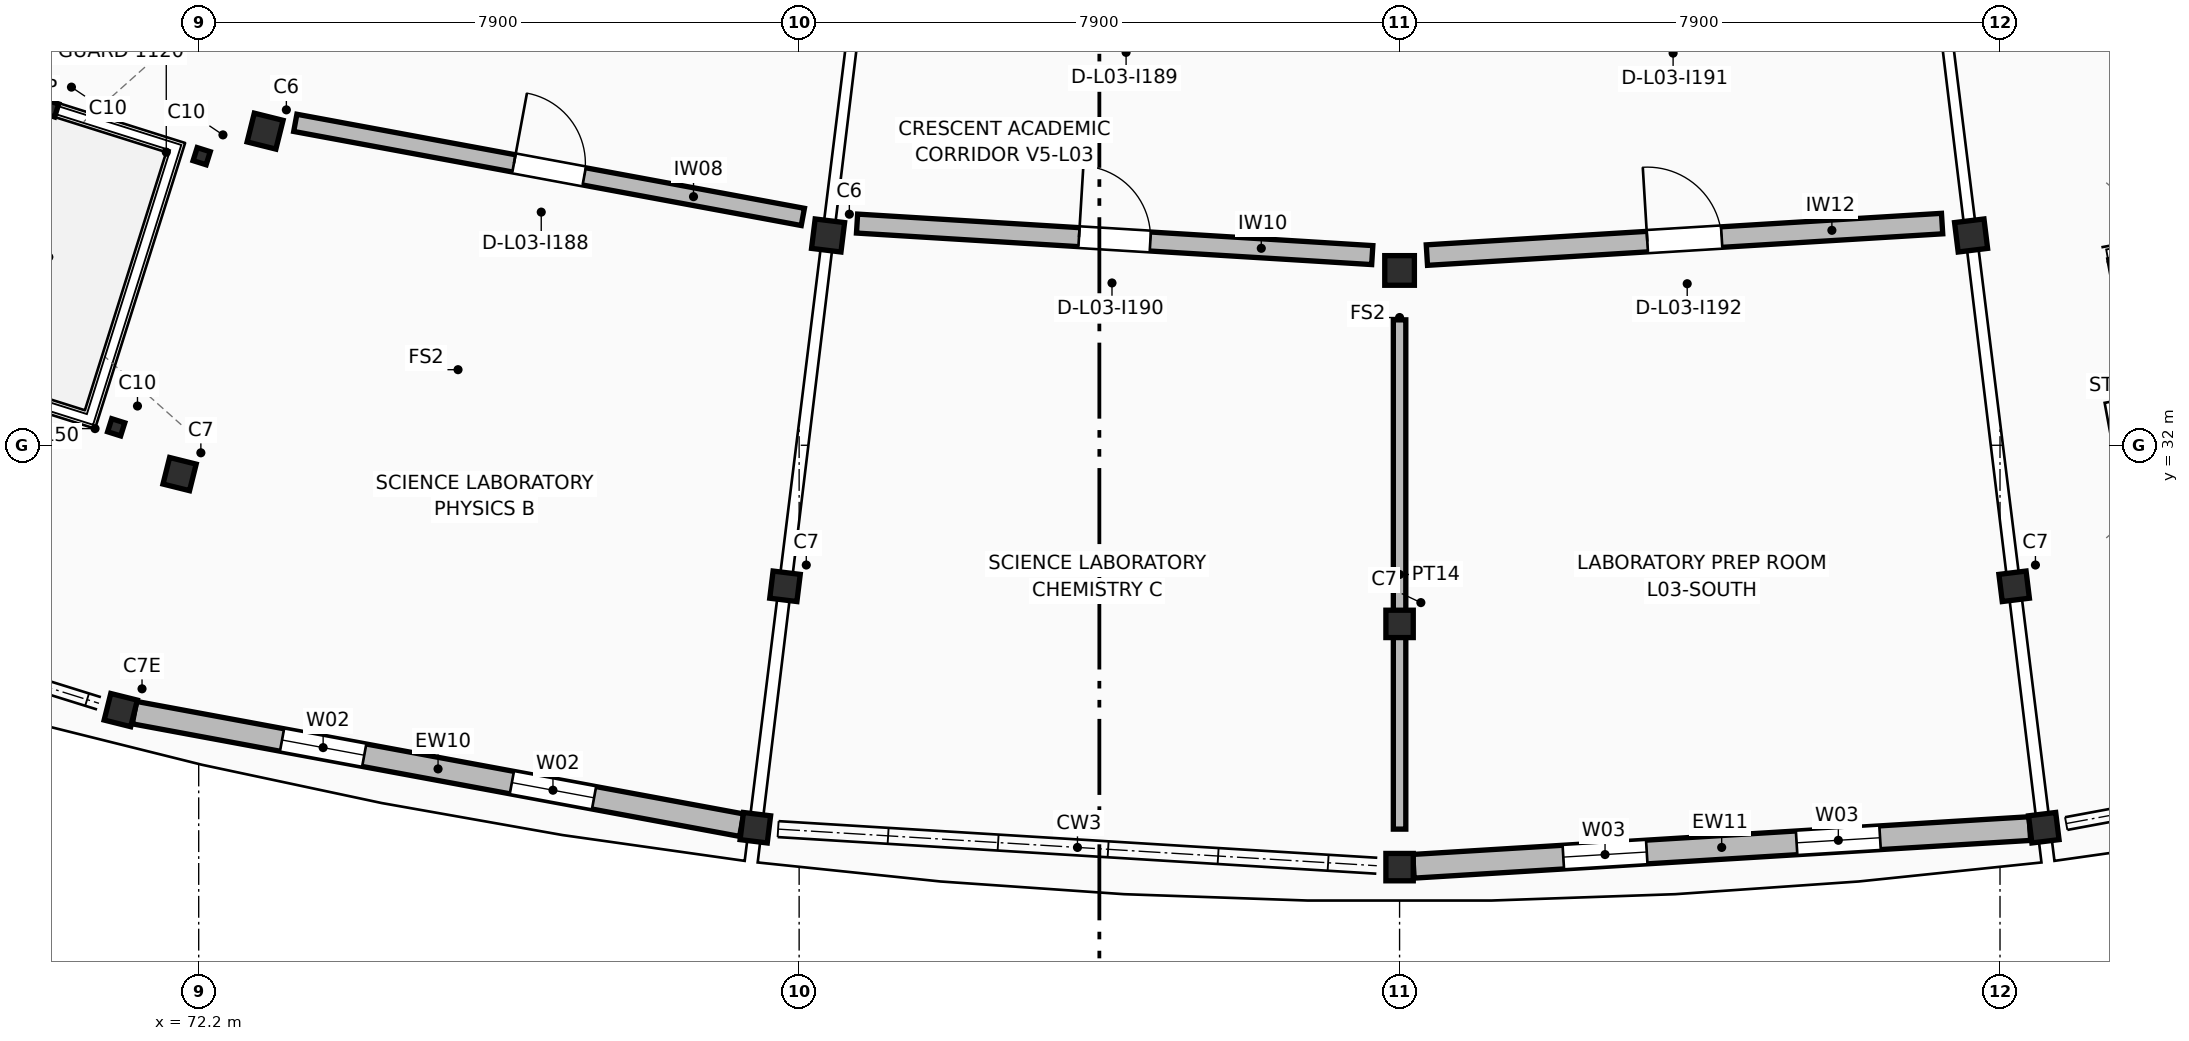
"""IFC4 building model, lengths in metres.
Left out: names, types, materials, properties, quantities, classifications, styles, units other than length and angle.
Written with IfcOpenShell. Run it as: python <this file> out.ifc"""

import sys

from ifc_helpers import new_model, si_unit, direction, frame, frame_2d, origin, origin_2d, place, context, subcontext, project, spatial, rectangle, hollow_rectangle, extrude, element, fill, save


model = new_model("IFC4")
c1 = context("Model", 3, precision=1e-05, world=origin(), true_north=direction((0.0, 1.0)))
c2 = subcontext(c1, "Body", "Model", "MODEL_VIEW")
j1 = project(units=[si_unit("LENGTHUNIT", "METRE"), si_unit("PLANEANGLEUNIT", "RADIAN")], contexts=[c1])
p1 = place(None, origin())
s1 = spatial("IfcSite", under=j1, at=p1, CompositionType="ELEMENT")
p2 = place(p1, origin())
s2 = spatial("IfcBuilding", under=s1, at=p2, CompositionType="ELEMENT")
p3 = place(p2, frame((0.0, 0.0, 11.9)))
s3 = spatial("IfcBuildingStorey", under=s2, at=p3, CompositionType="ELEMENT", Elevation=11.9)
p4 = place(p3, frame((73.073, 36.133, 0.0), z_axis=(0.0, 0.0, 1.0), x_axis=(-0.2419218956, -0.970295726276, 0.0)))
e1 = element("IfcColumn", 1, at=p4, inside=s3, PredefinedType="COLUMN", context=c2, shape_type="SweptSolid", body=[
    extrude(rectangle(XDim=0.39, YDim=0.39, at=origin_2d()), origin(), (0.0, 0.0, 1.0), 3.74),
])
for number, where, z_axis, x_axis in (
    (2, (71.948, 31.621, 0.0), (0.0, 0.0, 1.0), (-0.242, -0.97, 0.0)),
    (3, (71.174, 28.516, 0.0), (0.0, 0.0, 1.0), (-0.242, -0.97, 0.0)),
):
    element("IfcColumn", number, at=place(p3, frame(where, z_axis=z_axis, x_axis=x_axis)), inside=s3, PredefinedType="COLUMN", context=c2, shape_type="SweptSolid", body=[
        extrude(rectangle(XDim=0.36, YDim=0.36, at=origin_2d()), origin(), (0.0, 0.0, 1.0), 3.74),
    ])
p5 = place(p3, frame((80.481, 34.76, 0.0), z_axis=(0.0, 0.0, 1.0), x_axis=(-0.121869343405, -0.992546151641, 0.0)))
e4 = element("IfcColumn", 4, at=p5, inside=s3, PredefinedType="COLUMN", context=c2, shape_type="SweptSolid", body=[
    extrude(rectangle(XDim=0.39, YDim=0.39, at=origin_2d()), origin(), (0.0, 0.0, 1.0), 3.74),
])
for number, where, z_axis, x_axis in (
    (5, (79.914, 30.145, 0.0), (0.0, 0.0, 1.0), (-0.122, -0.993, 0.0)),
    (6, (79.524, 26.969, 0.0), (0.0, 0.0, 1.0), (-0.122, -0.993, 0.0)),
):
    element("IfcColumn", number, at=place(p3, frame(where, z_axis=z_axis, x_axis=x_axis)), inside=s3, PredefinedType="COLUMN", context=c2, shape_type="SweptSolid", body=[
        extrude(rectangle(XDim=0.36, YDim=0.36, at=origin_2d()), origin(), (0.0, 0.0, 1.0), 3.74),
    ])
p6 = place(p3, frame((88.0, 34.3, 0.0), z_axis=(0.0, 0.0, 1.0), x_axis=(0.0, -1.0, 0.0)))
e7 = element("IfcColumn", 7, at=p6, inside=s3, PredefinedType="COLUMN", context=c2, shape_type="SweptSolid", body=[
    extrude(rectangle(XDim=0.39, YDim=0.39, at=origin_2d()), origin(), (0.0, 0.0, 1.0), 3.74),
])
for number, where, z_axis, x_axis in (
    (8, (88.0, 29.65, 0.0), (0.0, 0.0, 1.0), (0.0, -1.0, 0.0)),
    (9, (88.0, 26.45, 0.0), (0.0, 0.0, 1.0), (0.0, -1.0, 0.0)),
):
    element("IfcColumn", number, at=place(p3, frame(where, z_axis=z_axis, x_axis=x_axis)), inside=s3, PredefinedType="COLUMN", context=c2, shape_type="SweptSolid", body=[
        extrude(rectangle(XDim=0.36, YDim=0.36, at=origin_2d()), origin(), (0.0, 0.0, 1.0), 3.74),
    ])
p7 = place(p3, frame((95.519, 34.76, 0.0), z_axis=(0.0, 0.0, 1.0), x_axis=(0.121869343405, -0.992546151641, 0.0)))
e10 = element("IfcColumn", 10, at=p7, inside=s3, PredefinedType="COLUMN", context=c2, shape_type="SweptSolid", body=[
    extrude(rectangle(XDim=0.39, YDim=0.39, at=origin_2d()), origin(), (0.0, 0.0, 1.0), 3.74),
])
for number, where, z_axis, x_axis in (
    (11, (96.086, 30.145, 0.0), (0.0, 0.0, 1.0), (0.122, -0.993, 0.0)),
    (12, (96.476, 26.969, 0.0), (0.0, 0.0, 1.0), (0.122, -0.993, 0.0)),
):
    element("IfcColumn", number, at=place(p3, frame(where, z_axis=z_axis, x_axis=x_axis)), inside=s3, PredefinedType="COLUMN", context=c2, shape_type="SweptSolid", body=[
        extrude(rectangle(XDim=0.36, YDim=0.36, at=origin_2d()), origin(), (0.0, 0.0, 1.0), 3.74),
    ])
p8 = place(p3, frame((71.354, 28.483, 0.0), z_axis=(0.0, 0.0, 1.0), x_axis=(0.98325170733, -0.182252791562, 0.0)))
e13 = element("IfcWall", 13, at=p8, inside=s3, PredefinedType="STANDARD", context=c2, shape_type="SweptSolid", body=[
    extrude(rectangle(XDim=8.126, YDim=0.3, at=frame_2d((4.063, 0.0))), origin(), (0.0, 0.0, 1.0), 2.8),
])
p9 = place(p8, frame((1.975, 0.0, 0.95)))
e14 = element("IfcOpeningElement", 14, at=p9, cuts=e13, PredefinedType="OPENING", context=c2, shape_type="SweptSolid", body=[
    extrude(rectangle(XDim=1.1, YDim=1.3, at=frame_2d((0.55, 0.65))), frame((0.0, 0.16, 0.0), z_axis=(0.0, -1.0, 0.0), x_axis=(1.0, 0.0, 0.0)), (0.0, 0.0, 1.0), 0.32),
])
p10 = place(p8, frame((5.051, 0.0, 0.95)))
e15 = element("IfcOpeningElement", 15, at=p10, cuts=e13, PredefinedType="OPENING", context=c2, shape_type="SweptSolid", body=[
    extrude(rectangle(XDim=1.1, YDim=1.3, at=frame_2d((0.55, 0.65))), frame((0.0, 0.16, 0.0), z_axis=(0.0, -1.0, 0.0), x_axis=(1.0, 0.0, 0.0)), (0.0, 0.0, 1.0), 0.32),
])
p11 = place(p3, frame((88.183, 26.461, 0.0), z_axis=(0.0, 0.0, 1.0), x_axis=(0.998134696936, 0.061050198789, 0.0)))
e16 = element("IfcWall", 16, at=p11, inside=s3, PredefinedType="STANDARD", context=c2, shape_type="SweptSolid", body=[
    extrude(rectangle(XDim=8.126, YDim=0.312, at=frame_2d((4.063, 0.0))), origin(), (0.0, 0.0, 1.0), 2.8),
])
p12 = place(p11, frame((1.975, 0.0, 0.95)))
e17 = element("IfcOpeningElement", 17, at=p12, cuts=e16, PredefinedType="OPENING", context=c2, shape_type="SweptSolid", body=[
    extrude(rectangle(XDim=1.1, YDim=1.45, at=frame_2d((0.55, 0.725))), frame((0.0, 0.166, 0.0), z_axis=(0.0, -1.0, 0.0), x_axis=(1.0, 0.0, 0.0)), (0.0, 0.0, 1.0), 0.332),
])
p13 = place(p11, frame((5.051, 0.0, 0.95)))
e18 = element("IfcOpeningElement", 18, at=p13, cuts=e16, PredefinedType="OPENING", context=c2, shape_type="SweptSolid", body=[
    extrude(rectangle(XDim=1.1, YDim=1.45, at=frame_2d((0.55, 0.725))), frame((0.0, 0.166, 0.0), z_axis=(0.0, -1.0, 0.0), x_axis=(1.0, 0.0, 0.0)), (0.0, 0.0, 1.0), 0.332),
])
for number, where, z_axis, x_axis in (
    (19, (70.246, 36.432, 0.0), (0.0, 0.0, 1.0), (0.954, -0.301, 0.0)),
    (20, (71.115, 32.236, 0.0), (0.0, 0.0, 1.0), (0.954, -0.301, 0.0)),
    (21, (72.239, 35.803, 0.0), (0.0, 0.0, 1.0), (0.954, -0.301, 0.0)),
):
    element("IfcColumn", number, at=place(p3, frame(where, z_axis=z_axis, x_axis=x_axis)), inside=s3, PredefinedType="COLUMN", context=c2, shape_type="SweptSolid", body=[
        extrude(hollow_rectangle(XDim=0.18, YDim=0.18, WallThickness=0.01, InnerFilletRadius=0.01, OuterFilletRadius=0.02, at=origin_2d()), origin(), (0.0, 0.0, 1.0), 3.74),
    ])
p14 = place(p3, frame((73.471, 36.242, 0.0), z_axis=(0.0, 0.0, 1.0), x_axis=(0.983257442509, -0.182221847619, 0.0)))
e22 = element("IfcWall", 22, at=p14, inside=s3, PredefinedType="STANDARD", context=c2, shape_type="SweptSolid", body=[
    extrude(rectangle(XDim=6.792, YDim=0.23, at=frame_2d((3.396, 0.0))), origin(), (0.0, 0.0, 1.0), 2.75),
])
p15 = place(p14, frame((2.926, 0.0, 0.0)))
e23 = element("IfcOpeningElement", 23, at=p15, cuts=e22, PredefinedType="OPENING", context=c2, shape_type="SweptSolid", body=[
    extrude(rectangle(XDim=0.94, YDim=2.06, at=frame_2d((0.47, 1.03))), frame((0.0, 0.125, 0.0), z_axis=(0.0, -1.0, 0.0), x_axis=(1.0, 0.0, 0.0)), (0.0, 0.0, 1.0), 0.25),
])
p16 = place(p3, frame((80.862, 34.917, 0.0), z_axis=(0.0, 0.0, 1.0), x_axis=(0.998135326973, -0.061039897184, 0.0)))
e24 = element("IfcWall", 24, at=p16, inside=s3, PredefinedType="STANDARD", context=c2, shape_type="SweptSolid", body=[
    extrude(rectangle(XDim=6.792, YDim=0.25, at=frame_2d((3.396, 0.0))), origin(), (0.0, 0.0, 1.0), 2.75),
])
p17 = place(p16, frame((2.926, 0.0, 0.0)))
e25 = element("IfcOpeningElement", 25, at=p17, cuts=e24, PredefinedType="OPENING", context=c2, shape_type="SweptSolid", body=[
    extrude(rectangle(XDim=0.94, YDim=2.18, at=frame_2d((0.47, 1.09))), frame((0.0, 0.135, 0.0), z_axis=(0.0, -1.0, 0.0), x_axis=(1.0, 0.0, 0.0)), (0.0, 0.0, 1.0), 0.27),
])
p18 = place(p3, frame((88.359, 34.502, 0.0), z_axis=(0.0, 0.0, 1.0), x_axis=(0.998135326973, 0.061039897184, 0.0)))
e26 = element("IfcWall", 26, at=p18, inside=s3, PredefinedType="STANDARD", context=c2, shape_type="SweptSolid", body=[
    extrude(rectangle(XDim=6.792, YDim=0.27, at=frame_2d((3.396, 0.0))), origin(), (0.0, 0.0, 1.0), 2.75),
])
p19 = place(p18, frame((2.906, 0.0, 0.0)))
e27 = element("IfcOpeningElement", 27, at=p19, cuts=e26, PredefinedType="OPENING", context=c2, shape_type="SweptSolid", body=[
    extrude(rectangle(XDim=0.98, YDim=2.06, at=frame_2d((0.49, 1.03))), frame((0.0, 0.145, 0.0), z_axis=(0.0, -1.0, 0.0), x_axis=(1.0, 0.0, 0.0)), (0.0, 0.0, 1.0), 0.29),
])
p20 = place(p3, frame((88.0, 33.65, 0.0), z_axis=(0.0, 0.0, 1.0), x_axis=(0.0, -1.0, 0.0)))
e28 = element("IfcWall", 28, at=p20, inside=s3, PredefinedType="PARTITIONING", context=c2, shape_type="SweptSolid", body=[
    extrude(rectangle(XDim=6.7, YDim=0.164, at=frame_2d((3.35, 0.0))), origin(), (0.0, 0.0, 1.0), 2.75),
])
p21 = place(p9, origin())
e29 = element("IfcWindow", 29, at=p21, inside=s3, PartitioningType="SINGLE_PANEL", PredefinedType="WINDOW", context=c2, shape_type="SweptSolid", body=[
    extrude(rectangle(XDim=1.1, YDim=1.3, at=frame_2d((0.55, 0.65))), frame((0.0, 0.03, 0.0), z_axis=(0.0, -1.0, 0.0), x_axis=(1.0, 0.0, 0.0)), (0.0, 0.0, 1.0), 0.06),
])
fill(e14, e29)
p22 = place(p10, origin())
e30 = element("IfcWindow", 30, at=p22, inside=s3, PartitioningType="SINGLE_PANEL", PredefinedType="WINDOW", context=c2, shape_type="SweptSolid", body=[
    extrude(rectangle(XDim=1.1, YDim=1.3, at=frame_2d((0.55, 0.65))), frame((0.0, 0.03, 0.0), z_axis=(0.0, -1.0, 0.0), x_axis=(1.0, 0.0, 0.0)), (0.0, 0.0, 1.0), 0.06),
])
fill(e15, e30)
p23 = place(p12, origin())
e31 = element("IfcWindow", 31, at=p23, inside=s3, PartitioningType="SINGLE_PANEL", PredefinedType="WINDOW", context=c2, shape_type="SweptSolid", body=[
    extrude(rectangle(XDim=1.1, YDim=1.45, at=frame_2d((0.55, 0.725))), frame((0.0, 0.03, 0.0), z_axis=(0.0, -1.0, 0.0), x_axis=(1.0, 0.0, 0.0)), (0.0, 0.0, 1.0), 0.06),
])
fill(e17, e31)
p24 = place(p13, origin())
e32 = element("IfcWindow", 32, at=p24, inside=s3, PartitioningType="SINGLE_PANEL", PredefinedType="WINDOW", context=c2, shape_type="SweptSolid", body=[
    extrude(rectangle(XDim=1.1, YDim=1.45, at=frame_2d((0.55, 0.725))), frame((0.0, 0.03, 0.0), z_axis=(0.0, -1.0, 0.0), x_axis=(1.0, 0.0, 0.0)), (0.0, 0.0, 1.0), 0.06),
])
fill(e18, e32)
p25 = place(p15, origin())
e33 = element("IfcDoor", 33, at=p25, inside=s3, OperationType="SINGLE_SWING_LEFT", PredefinedType="DOOR", context=c2, shape_type="SweptSolid", body=[
    extrude(rectangle(XDim=0.94, YDim=2.06, at=frame_2d((0.47, 1.03))), frame((0.0, 0.025, 0.0), z_axis=(0.0, -1.0, 0.0), x_axis=(1.0, 0.0, 0.0)), (0.0, 0.0, 1.0), 0.05),
])
fill(e23, e33)
p26 = place(p17, origin())
e34 = element("IfcDoor", 34, at=p26, inside=s3, OperationType="SINGLE_SWING_LEFT", PredefinedType="DOOR", context=c2, shape_type="SweptSolid", body=[
    extrude(rectangle(XDim=0.94, YDim=2.18, at=frame_2d((0.47, 1.09))), frame((0.0, 0.025, 0.0), z_axis=(0.0, -1.0, 0.0), x_axis=(1.0, 0.0, 0.0)), (0.0, 0.0, 1.0), 0.05),
])
fill(e25, e34)
p27 = place(p19, origin())
e35 = element("IfcDoor", 35, at=p27, inside=s3, OperationType="SINGLE_SWING_LEFT", PredefinedType="DOOR", context=c2, shape_type="SweptSolid", body=[
    extrude(rectangle(XDim=0.98, YDim=2.06, at=frame_2d((0.49, 1.03))), frame((0.0, 0.025, 0.0), z_axis=(0.0, -1.0, 0.0), x_axis=(1.0, 0.0, 0.0)), (0.0, 0.0, 1.0), 0.05),
])
fill(e27, e35)
save(model, sys.argv[1])
